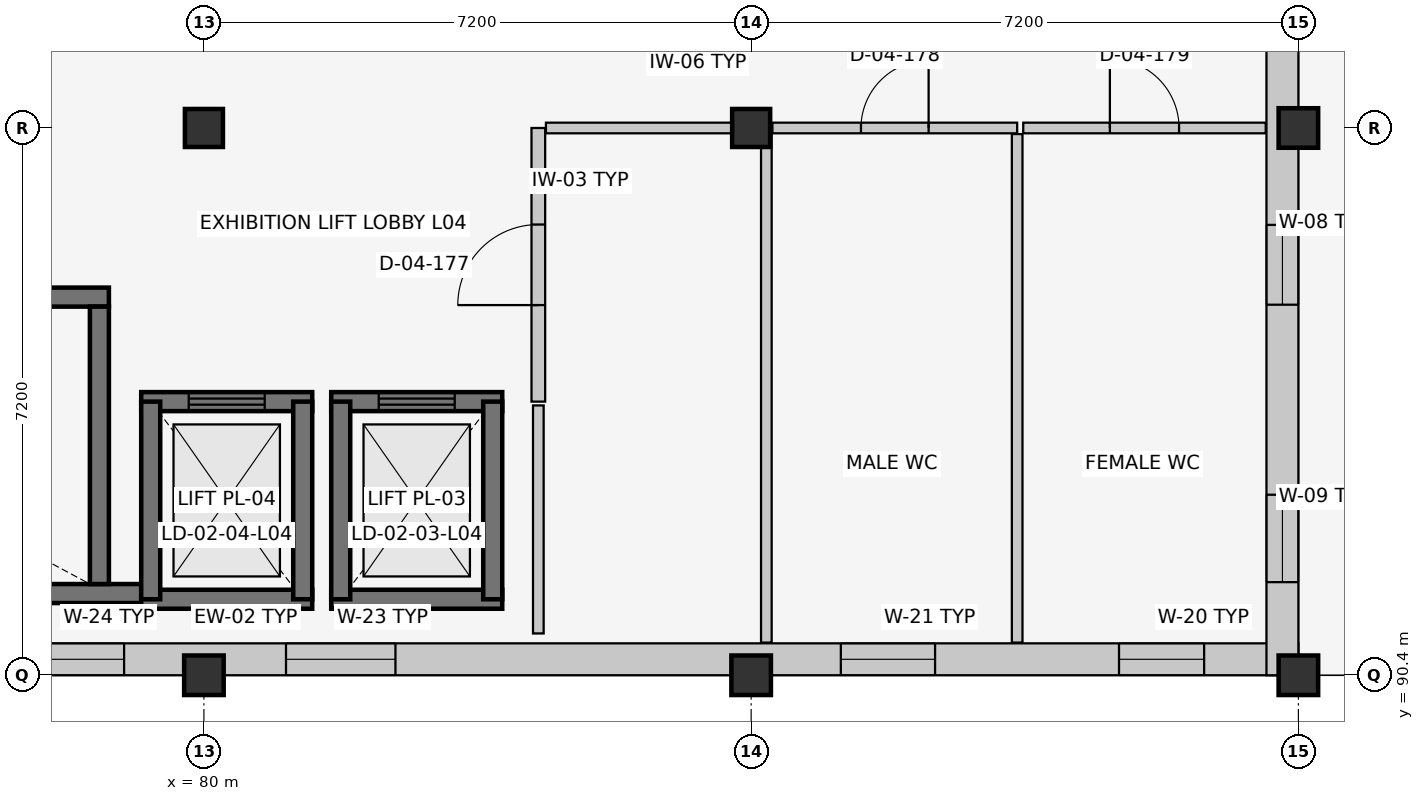
"""IFC4 building model, lengths in metres.
Left out: names, types, materials, properties, quantities, classifications, styles, units other than length and angle.
Written with IfcOpenShell. Run it as: python <this file> out.ifc"""

import sys

from ifc_helpers import new_model, si_unit, direction, frame, frame_2d, origin, origin_2d, place, context, subcontext, project, spatial, rectangle, extrude, element, fill, save


model = new_model("IFC4")
c1 = context("Model", 3, precision=1e-05, world=origin(), true_north=direction((0.0, 1.0)))
c2 = subcontext(c1, "Body", "Model", "MODEL_VIEW")
j1 = project(units=[si_unit("LENGTHUNIT", "METRE"), si_unit("PLANEANGLEUNIT", "RADIAN")], contexts=[c1])
p1 = place(None, origin())
s1 = spatial("IfcSite", under=j1, at=p1, CompositionType="ELEMENT")
p2 = place(p1, origin())
s2 = spatial("IfcBuilding", under=s1, at=p2, CompositionType="ELEMENT")
p3 = place(p2, frame((0.0, 0.0, 18.0)))
s3 = spatial("IfcBuildingStorey", under=s2, at=p3, CompositionType="ELEMENT", Elevation=18.0)
p4 = place(p3, frame((80.0, 90.4, 0.0), z_axis=(0.0, 0.0, 1.0), x_axis=(1.0, 0.0, 0.0)))
e1 = element("IfcColumn", 1, at=p4, inside=s3, PredefinedType="COLUMN", context=c2, shape_type="SweptSolid", body=[
    extrude(rectangle(XDim=0.52, YDim=0.52, at=origin_2d()), origin(), (0.0, 0.0, 1.0), 3.9),
])
p5 = place(p3, frame((80.0, 97.6, 0.0), z_axis=(0.0, 0.0, 1.0), x_axis=(1.0, 0.0, 0.0)))
e2 = element("IfcColumn", 2, at=p5, inside=s3, PredefinedType="COLUMN", context=c2, shape_type="SweptSolid", body=[
    extrude(rectangle(XDim=0.5, YDim=0.5, at=origin_2d()), origin(), (0.0, 0.0, 1.0), 3.9),
])
p6 = place(p3, frame((87.2, 90.4, 0.0), z_axis=(0.0, 0.0, 1.0), x_axis=(1.0, 0.0, 0.0)))
e3 = element("IfcColumn", 3, at=p6, inside=s3, PredefinedType="COLUMN", context=c2, shape_type="SweptSolid", body=[
    extrude(rectangle(XDim=0.52, YDim=0.52, at=origin_2d()), origin(), (0.0, 0.0, 1.0), 3.9),
])
p7 = place(p3, frame((87.2, 97.6, 0.0), z_axis=(0.0, 0.0, 1.0), x_axis=(1.0, 0.0, 0.0)))
e4 = element("IfcColumn", 4, at=p7, inside=s3, PredefinedType="COLUMN", context=c2, shape_type="SweptSolid", body=[
    extrude(rectangle(XDim=0.5, YDim=0.5, at=origin_2d()), origin(), (0.0, 0.0, 1.0), 3.9),
])
for number, where, z_axis, x_axis in (
    (5, (94.4, 90.4, 0.0), (0.0, 0.0, 1.0), (1.0, 0.0, 0.0)),
    (6, (94.4, 97.6, 0.0), (0.0, 0.0, 1.0), (1.0, 0.0, 0.0)),
):
    element("IfcColumn", number, at=place(p3, frame(where, z_axis=z_axis, x_axis=x_axis)), inside=s3, PredefinedType="COLUMN", context=c2, shape_type="SweptSolid", body=[
        extrude(rectangle(XDim=0.52, YDim=0.52, at=origin_2d()), origin(), (0.0, 0.0, 1.0), 3.9),
    ])
p8 = place(p3, frame((94.4, 90.61, 0.0), z_axis=(0.0, 0.0, 1.0), x_axis=(-1.0, 0.0, 0.0)))
e7 = element("IfcWall", 7, at=p8, inside=s3, PredefinedType="SOLIDWALL", context=c2, shape_type="SweptSolid", body=[
    extrude(rectangle(XDim=28.8, YDim=0.42, at=frame_2d((14.4, 0.0))), origin(), (0.0, 0.0, 1.0), 2.875),
])
p9 = place(p8, frame((1.24, 0.0, 0.9)))
e8 = element("IfcOpeningElement", 8, at=p9, cuts=e7, PredefinedType="OPENING", context=c2, shape_type="SweptSolid", body=[
    extrude(rectangle(XDim=1.12, YDim=1.75, at=frame_2d((0.56, 0.875))), frame((0.0, 0.222, 0.0), z_axis=(0.0, -1.0, 0.0), x_axis=(1.0, 0.0, 0.0)), (0.0, 0.0, 1.0), 0.444),
])
p10 = place(p8, frame((4.78, 0.0, 0.9)))
e9 = element("IfcOpeningElement", 9, at=p10, cuts=e7, PredefinedType="OPENING", context=c2, shape_type="SweptSolid", body=[
    extrude(rectangle(XDim=1.24, YDim=1.75, at=frame_2d((0.62, 0.875))), frame((0.0, 0.222, 0.0), z_axis=(0.0, -1.0, 0.0), x_axis=(1.0, 0.0, 0.0)), (0.0, 0.0, 1.0), 0.444),
])
p11 = place(p8, frame((11.88, 0.0, 0.9)))
e10 = element("IfcOpeningElement", 10, at=p11, cuts=e7, PredefinedType="OPENING", context=c2, shape_type="SweptSolid", body=[
    extrude(rectangle(XDim=1.44, YDim=1.75, at=frame_2d((0.72, 0.875))), frame((0.0, 0.222, 0.0), z_axis=(0.0, -1.0, 0.0), x_axis=(1.0, 0.0, 0.0)), (0.0, 0.0, 1.0), 0.444),
])
p12 = place(p8, frame((15.45, 0.0, 0.9)))
e11 = element("IfcOpeningElement", 11, at=p12, cuts=e7, PredefinedType="OPENING", context=c2, shape_type="SweptSolid", body=[
    extrude(rectangle(XDim=1.5, YDim=1.75, at=frame_2d((0.75, 0.875))), frame((0.0, 0.222, 0.0), z_axis=(0.0, -1.0, 0.0), x_axis=(1.0, 0.0, 0.0)), (0.0, 0.0, 1.0), 0.444),
])
p13 = place(p8, frame((19.35, 0.0, 0.9)))
e12 = element("IfcOpeningElement", 12, at=p13, cuts=e7, PredefinedType="OPENING", context=c2, shape_type="SweptSolid", body=[
    extrude(rectangle(XDim=0.9, YDim=1.35, at=frame_2d((0.45, 0.675))), frame((0.0, 0.222, 0.0), z_axis=(0.0, -1.0, 0.0), x_axis=(1.0, 0.0, 0.0)), (0.0, 0.0, 1.0), 0.444),
])
p14 = place(p8, frame((22.9, 0.0, 0.9)))
e13 = element("IfcOpeningElement", 13, at=p14, cuts=e7, PredefinedType="OPENING", context=c2, shape_type="SweptSolid", body=[
    extrude(rectangle(XDim=1.0, YDim=1.35, at=frame_2d((0.5, 0.675))), frame((0.0, 0.222, 0.0), z_axis=(0.0, -1.0, 0.0), x_axis=(1.0, 0.0, 0.0)), (0.0, 0.0, 1.0), 0.444),
])
p15 = place(p8, frame((26.45, 0.0, 0.9)))
e14 = element("IfcOpeningElement", 14, at=p15, cuts=e7, PredefinedType="OPENING", context=c2, shape_type="SweptSolid", body=[
    extrude(rectangle(XDim=1.1, YDim=1.35, at=frame_2d((0.55, 0.675))), frame((0.0, 0.222, 0.0), z_axis=(0.0, -1.0, 0.0), x_axis=(1.0, 0.0, 0.0)), (0.0, 0.0, 1.0), 0.444),
])
p16 = place(p3, frame((94.19, 112.0, 0.0), z_axis=(0.0, 0.0, 1.0), x_axis=(0.0, -1.0, 0.0)))
e15 = element("IfcWall", 15, at=p16, inside=s3, PredefinedType="SOLIDWALL", context=c2, shape_type="SweptSolid", body=[
    extrude(rectangle(XDim=21.6, YDim=0.42, at=frame_2d((10.8, 0.0))), origin(), (0.0, 0.0, 1.0), 2.975),
])
p17 = place(p16, frame((1.2, 0.0, 0.9)))
e16 = element("IfcOpeningElement", 16, at=p17, cuts=e15, PredefinedType="OPENING", context=c2, shape_type="SweptSolid", body=[
    extrude(rectangle(XDim=1.2, YDim=1.35, at=frame_2d((0.6, 0.675))), frame((0.0, 0.222, 0.0), z_axis=(0.0, -1.0, 0.0), x_axis=(1.0, 0.0, 0.0)), (0.0, 0.0, 1.0), 0.444),
])
p18 = place(p16, frame((4.75, 0.0, 0.9)))
e17 = element("IfcOpeningElement", 17, at=p18, cuts=e15, PredefinedType="OPENING", context=c2, shape_type="SweptSolid", body=[
    extrude(rectangle(XDim=1.3, YDim=1.35, at=frame_2d((0.65, 0.675))), frame((0.0, 0.222, 0.0), z_axis=(0.0, -1.0, 0.0), x_axis=(1.0, 0.0, 0.0)), (0.0, 0.0, 1.0), 0.444),
])
p19 = place(p16, frame((8.3, 0.0, 0.9)))
e18 = element("IfcOpeningElement", 18, at=p19, cuts=e15, PredefinedType="OPENING", context=c2, shape_type="SweptSolid", body=[
    extrude(rectangle(XDim=1.4, YDim=1.35, at=frame_2d((0.7, 0.675))), frame((0.0, 0.222, 0.0), z_axis=(0.0, -1.0, 0.0), x_axis=(1.0, 0.0, 0.0)), (0.0, 0.0, 1.0), 0.444),
])
p20 = place(p16, frame((12.125, 0.0, 0.9)))
e19 = element("IfcOpeningElement", 19, at=p20, cuts=e15, PredefinedType="OPENING", context=c2, shape_type="SweptSolid", body=[
    extrude(rectangle(XDim=0.95, YDim=1.45, at=frame_2d((0.475, 0.725))), frame((0.0, 0.222, 0.0), z_axis=(0.0, -1.0, 0.0), x_axis=(1.0, 0.0, 0.0)), (0.0, 0.0, 1.0), 0.444),
])
p21 = place(p16, frame((15.675, 0.0, 0.9)))
e20 = element("IfcOpeningElement", 20, at=p21, cuts=e15, PredefinedType="OPENING", context=c2, shape_type="SweptSolid", body=[
    extrude(rectangle(XDim=1.05, YDim=1.45, at=frame_2d((0.525, 0.725))), frame((0.0, 0.222, 0.0), z_axis=(0.0, -1.0, 0.0), x_axis=(1.0, 0.0, 0.0)), (0.0, 0.0, 1.0), 0.444),
])
p22 = place(p16, frame((19.225, 0.0, 0.9)))
e21 = element("IfcOpeningElement", 21, at=p22, cuts=e15, PredefinedType="OPENING", context=c2, shape_type="SweptSolid", body=[
    extrude(rectangle(XDim=1.15, YDim=1.45, at=frame_2d((0.575, 0.725))), frame((0.0, 0.222, 0.0), z_axis=(0.0, -1.0, 0.0), x_axis=(1.0, 0.0, 0.0)), (0.0, 0.0, 1.0), 0.444),
])
p23 = place(p3, frame((69.75, 91.475, 0.0), z_axis=(0.0, 0.0, 1.0), x_axis=(1.0, 0.0, 0.0)))
e22 = element("IfcWall", 22, at=p23, inside=s3, PredefinedType="SHEAR", context=c2, shape_type="SweptSolid", body=[
    extrude(rectangle(XDim=9.57, YDim=0.25, at=frame_2d((4.785, 0.0))), origin(), (0.0, 0.0, 1.0), 3.58),
])
p24 = place(p3, frame((78.75, 95.375, 0.0), z_axis=(0.0, 0.0, 1.0), x_axis=(-1.0, 0.0, 0.0)))
e23 = element("IfcWall", 23, at=p24, inside=s3, PredefinedType="SHEAR", context=c2, shape_type="SweptSolid", body=[
    extrude(rectangle(XDim=9.0, YDim=0.25, at=frame_2d((4.5, 0.0))), origin(), (0.0, 0.0, 1.0), 3.58),
])
p25 = place(p3, frame((78.625, 91.6, 0.0), z_axis=(0.0, 0.0, 1.0), x_axis=(0.0, 1.0, 0.0)))
e24 = element("IfcWall", 24, at=p25, inside=s3, PredefinedType="SHEAR", context=c2, shape_type="SweptSolid", body=[
    extrude(rectangle(XDim=3.65, YDim=0.25, at=frame_2d((1.825, 0.0))), origin(), (0.0, 0.0, 1.0), 3.58),
])
p26 = place(p3, frame((79.175, 91.4, 0.0), z_axis=(0.0, 0.0, 1.0), x_axis=(1.0, 0.0, 0.0)))
e25 = element("IfcWall", 25, at=p26, inside=s3, PredefinedType="SHEAR", context=c2, shape_type="SweptSolid", body=[
    extrude(rectangle(XDim=2.25, YDim=0.25, at=frame_2d((1.125, 0.0))), origin(), (0.0, 0.0, 1.0), 3.58),
])
p27 = place(p3, frame((81.425, 94.0, 0.0), z_axis=(0.0, 0.0, 1.0), x_axis=(-1.0, 0.0, 0.0)))
e26 = element("IfcWall", 26, at=p27, inside=s3, PredefinedType="SHEAR", context=c2, shape_type="SweptSolid", body=[
    extrude(rectangle(XDim=2.25, YDim=0.25, at=frame_2d((1.125, 0.0))), origin(), (0.0, 0.0, 1.0), 3.58),
])
p28 = place(p27, frame((0.625, 0.0, 0.0)))
e27 = element("IfcOpeningElement", 27, at=p28, cuts=e26, PredefinedType="OPENING", context=c2, shape_type="SweptSolid", body=[
    extrude(rectangle(XDim=1.0, YDim=2.15, at=frame_2d((0.5, 1.075))), frame((0.0, 0.137, 0.0), z_axis=(0.0, -1.0, 0.0), x_axis=(1.0, 0.0, 0.0)), (0.0, 0.0, 1.0), 0.274),
])
for number, where, z_axis, x_axis in (
    (28, (79.3, 94.0, 0.0), (0.0, 0.0, 1.0), (0.0, -1.0, 0.0)),
    (29, (81.3, 91.4, 0.0), (0.0, 0.0, 1.0), (0.0, 1.0, 0.0)),
):
    element("IfcWall", number, at=place(p3, frame(where, z_axis=z_axis, x_axis=x_axis)), inside=s3, PredefinedType="SHEAR", context=c2, shape_type="SweptSolid", body=[
        extrude(rectangle(XDim=2.6, YDim=0.25, at=frame_2d((1.3, 0.0))), origin(), (0.0, 0.0, 1.0), 3.58),
    ])
p29 = place(p3, frame((81.675, 91.4, 0.0), z_axis=(0.0, 0.0, 1.0), x_axis=(1.0, 0.0, 0.0)))
e30 = element("IfcWall", 30, at=p29, inside=s3, PredefinedType="SHEAR", context=c2, shape_type="SweptSolid", body=[
    extrude(rectangle(XDim=2.25, YDim=0.25, at=frame_2d((1.125, 0.0))), origin(), (0.0, 0.0, 1.0), 3.58),
])
p30 = place(p3, frame((83.925, 94.0, 0.0), z_axis=(0.0, 0.0, 1.0), x_axis=(-1.0, 0.0, 0.0)))
e31 = element("IfcWall", 31, at=p30, inside=s3, PredefinedType="SHEAR", context=c2, shape_type="SweptSolid", body=[
    extrude(rectangle(XDim=2.25, YDim=0.25, at=frame_2d((1.125, 0.0))), origin(), (0.0, 0.0, 1.0), 3.58),
])
p31 = place(p30, frame((0.625, 0.0, 0.0)))
e32 = element("IfcOpeningElement", 32, at=p31, cuts=e31, PredefinedType="OPENING", context=c2, shape_type="SweptSolid", body=[
    extrude(rectangle(XDim=1.0, YDim=2.15, at=frame_2d((0.5, 1.075))), frame((0.0, 0.137, 0.0), z_axis=(0.0, -1.0, 0.0), x_axis=(1.0, 0.0, 0.0)), (0.0, 0.0, 1.0), 0.274),
])
for number, where, z_axis, x_axis in (
    (33, (81.8, 94.0, 0.0), (0.0, 0.0, 1.0), (0.0, -1.0, 0.0)),
    (34, (83.8, 91.4, 0.0), (0.0, 0.0, 1.0), (0.0, 1.0, 0.0)),
):
    element("IfcWall", number, at=place(p3, frame(where, z_axis=z_axis, x_axis=x_axis)), inside=s3, PredefinedType="SHEAR", context=c2, shape_type="SweptSolid", body=[
        extrude(rectangle(XDim=2.6, YDim=0.25, at=frame_2d((1.3, 0.0))), origin(), (0.0, 0.0, 1.0), 3.58),
    ])
p32 = place(p3, frame((84.4, 94.0, 0.0), z_axis=(0.0, 0.0, 1.0), x_axis=(0.0, 1.0, 0.0)))
e35 = element("IfcWall", 35, at=p32, inside=s3, PredefinedType="PARTITIONING", context=c2, shape_type="SweptSolid", body=[
    extrude(rectangle(XDim=3.6, YDim=0.18, at=frame_2d((1.8, 0.0))), origin(), (0.0, 0.0, 1.0), 3.58),
])
p33 = place(p32, frame((1.27, 0.0, 0.0)))
e36 = element("IfcOpeningElement", 36, at=p33, cuts=e35, PredefinedType="OPENING", context=c2, shape_type="SweptSolid", body=[
    extrude(rectangle(XDim=1.06, YDim=2.1, at=frame_2d((0.53, 1.05))), frame((0.0, 0.102, 0.0), z_axis=(0.0, -1.0, 0.0), x_axis=(1.0, 0.0, 0.0)), (0.0, 0.0, 1.0), 0.204),
])
p34 = place(p3, frame((84.5, 97.6, 0.0), z_axis=(0.0, 0.0, 1.0), x_axis=(1.0, 0.0, 0.0)))
e37 = element("IfcWall", 37, at=p34, inside=s3, PredefinedType="PARTITIONING", context=c2, shape_type="SweptSolid", body=[
    extrude(rectangle(XDim=2.9, YDim=0.14, at=frame_2d((1.45, 0.0))), origin(), (0.0, 0.0, 1.0), 2.905),
])
p35 = place(p3, frame((87.4, 90.83, 0.0), z_axis=(0.0, 0.0, 1.0), x_axis=(0.0, 1.0, 0.0)))
e38 = element("IfcWall", 38, at=p35, inside=s3, PredefinedType="PARTITIONING", context=c2, shape_type="SweptSolid", body=[
    extrude(rectangle(XDim=6.69, YDim=0.14, at=frame_2d((3.345, 0.0))), origin(), (0.0, 0.0, 1.0), 2.955),
])
p36 = place(p3, frame((87.48, 97.6, 0.0), z_axis=(0.0, 0.0, 1.0), x_axis=(1.0, 0.0, 0.0)))
e39 = element("IfcWall", 39, at=p36, inside=s3, PredefinedType="PARTITIONING", context=c2, shape_type="SweptSolid", body=[
    extrude(rectangle(XDim=3.22, YDim=0.14, at=frame_2d((1.61, 0.0))), origin(), (0.0, 0.0, 1.0), 2.905),
])
p37 = place(p36, frame((1.165, 0.0, 0.0)))
e40 = element("IfcOpeningElement", 40, at=p37, cuts=e39, PredefinedType="OPENING", context=c2, shape_type="SweptSolid", body=[
    extrude(rectangle(XDim=0.89, YDim=2.05, at=frame_2d((0.445, 1.025))), frame((0.0, 0.082, 0.0), z_axis=(0.0, -1.0, 0.0), x_axis=(1.0, 0.0, 0.0)), (0.0, 0.0, 1.0), 0.164),
])
p38 = place(p3, frame((90.7, 90.83, 0.0), z_axis=(0.0, 0.0, 1.0), x_axis=(0.0, 1.0, 0.0)))
e41 = element("IfcWall", 41, at=p38, inside=s3, PredefinedType="PARTITIONING", context=c2, shape_type="SweptSolid", body=[
    extrude(rectangle(XDim=6.69, YDim=0.14, at=frame_2d((3.345, 0.0))), origin(), (0.0, 0.0, 1.0), 3.105),
])
p39 = place(p3, frame((90.78, 97.6, 0.0), z_axis=(0.0, 0.0, 1.0), x_axis=(1.0, 0.0, 0.0)))
e42 = element("IfcWall", 42, at=p39, inside=s3, PredefinedType="PARTITIONING", context=c2, shape_type="SweptSolid", body=[
    extrude(rectangle(XDim=3.19, YDim=0.14, at=frame_2d((1.595, 0.0))), origin(), (0.0, 0.0, 1.0), 2.905),
])
p40 = place(p39, frame((1.14, 0.0, 0.0)))
e43 = element("IfcOpeningElement", 43, at=p40, cuts=e42, PredefinedType="OPENING", context=c2, shape_type="SweptSolid", body=[
    extrude(rectangle(XDim=0.91, YDim=2.06, at=frame_2d((0.455, 1.03))), frame((0.0, 0.082, 0.0), z_axis=(0.0, -1.0, 0.0), x_axis=(1.0, 0.0, 0.0)), (0.0, 0.0, 1.0), 0.164),
])
p41 = place(p3, frame((84.4, 90.95, 0.0), z_axis=(0.0, 0.0, 1.0), x_axis=(0.0, 1.0, 0.0)))
e44 = element("IfcWall", 44, at=p41, inside=s3, PredefinedType="PARTITIONING", context=c2, shape_type="SweptSolid", body=[
    extrude(rectangle(XDim=3.0, YDim=0.14, at=frame_2d((1.5, 0.0))), origin(), (0.0, 0.0, 1.0), 3.58),
])
p42 = place(p9, origin())
e45 = element("IfcWindow", 45, at=p42, inside=s3, PartitioningType="SINGLE_PANEL", PredefinedType="WINDOW", context=c2, shape_type="SweptSolid", body=[
    extrude(rectangle(XDim=1.12, YDim=1.75, at=frame_2d((0.56, 0.875))), frame((0.0, 0.03, 0.0), z_axis=(0.0, -1.0, 0.0), x_axis=(1.0, 0.0, 0.0)), (0.0, 0.0, 1.0), 0.06),
])
fill(e8, e45)
p43 = place(p10, origin())
e46 = element("IfcWindow", 46, at=p43, inside=s3, PartitioningType="SINGLE_PANEL", PredefinedType="WINDOW", context=c2, shape_type="SweptSolid", body=[
    extrude(rectangle(XDim=1.24, YDim=1.75, at=frame_2d((0.62, 0.875))), frame((0.0, 0.03, 0.0), z_axis=(0.0, -1.0, 0.0), x_axis=(1.0, 0.0, 0.0)), (0.0, 0.0, 1.0), 0.06),
])
fill(e9, e46)
p44 = place(p11, origin())
e47 = element("IfcWindow", 47, at=p44, inside=s3, PartitioningType="SINGLE_PANEL", PredefinedType="WINDOW", context=c2, shape_type="SweptSolid", body=[
    extrude(rectangle(XDim=1.44, YDim=1.75, at=frame_2d((0.72, 0.875))), frame((0.0, 0.03, 0.0), z_axis=(0.0, -1.0, 0.0), x_axis=(1.0, 0.0, 0.0)), (0.0, 0.0, 1.0), 0.06),
])
fill(e10, e47)
p45 = place(p12, origin())
e48 = element("IfcWindow", 48, at=p45, inside=s3, PartitioningType="SINGLE_PANEL", PredefinedType="WINDOW", context=c2, shape_type="SweptSolid", body=[
    extrude(rectangle(XDim=1.5, YDim=1.75, at=frame_2d((0.75, 0.875))), frame((0.0, 0.03, 0.0), z_axis=(0.0, -1.0, 0.0), x_axis=(1.0, 0.0, 0.0)), (0.0, 0.0, 1.0), 0.06),
])
fill(e11, e48)
p46 = place(p21, origin())
e49 = element("IfcWindow", 49, at=p46, inside=s3, PartitioningType="SINGLE_PANEL", PredefinedType="WINDOW", context=c2, shape_type="SweptSolid", body=[
    extrude(rectangle(XDim=1.05, YDim=1.45, at=frame_2d((0.525, 0.725))), frame((0.0, 0.03, 0.0), z_axis=(0.0, -1.0, 0.0), x_axis=(1.0, 0.0, 0.0)), (0.0, 0.0, 1.0), 0.06),
])
fill(e20, e49)
p47 = place(p22, origin())
e50 = element("IfcWindow", 50, at=p47, inside=s3, PartitioningType="SINGLE_PANEL", PredefinedType="WINDOW", context=c2, shape_type="SweptSolid", body=[
    extrude(rectangle(XDim=1.15, YDim=1.45, at=frame_2d((0.575, 0.725))), frame((0.0, 0.03, 0.0), z_axis=(0.0, -1.0, 0.0), x_axis=(1.0, 0.0, 0.0)), (0.0, 0.0, 1.0), 0.06),
])
fill(e21, e50)
p48 = place(p28, origin())
e51 = element("IfcDoor", 51, at=p48, inside=s3, OperationType="SLIDING_TO_LEFT", PredefinedType="DOOR", context=c2, shape_type="SweptSolid", body=[
    extrude(rectangle(XDim=1.0, YDim=2.15, at=frame_2d((0.5, 1.075))), frame((0.0, 0.025, 0.0), z_axis=(0.0, -1.0, 0.0), x_axis=(1.0, 0.0, 0.0)), (0.0, 0.0, 1.0), 0.05),
])
fill(e27, e51)
p49 = place(p31, origin())
e52 = element("IfcDoor", 52, at=p49, inside=s3, OperationType="SLIDING_TO_LEFT", PredefinedType="DOOR", context=c2, shape_type="SweptSolid", body=[
    extrude(rectangle(XDim=1.0, YDim=2.15, at=frame_2d((0.5, 1.075))), frame((0.0, 0.025, 0.0), z_axis=(0.0, -1.0, 0.0), x_axis=(1.0, 0.0, 0.0)), (0.0, 0.0, 1.0), 0.05),
])
fill(e32, e52)
p50 = place(p33, origin())
e53 = element("IfcDoor", 53, at=p50, inside=s3, OperationType="SINGLE_SWING_LEFT", PredefinedType="DOOR", context=c2, shape_type="SweptSolid", body=[
    extrude(rectangle(XDim=1.06, YDim=2.1, at=frame_2d((0.53, 1.05))), frame((0.0, 0.025, 0.0), z_axis=(0.0, -1.0, 0.0), x_axis=(1.0, 0.0, 0.0)), (0.0, 0.0, 1.0), 0.05),
])
fill(e36, e53)
p51 = place(p37, origin())
e54 = element("IfcDoor", 54, at=p51, inside=s3, OperationType="SINGLE_SWING_RIGHT", PredefinedType="DOOR", context=c2, shape_type="SweptSolid", body=[
    extrude(rectangle(XDim=0.89, YDim=2.05, at=frame_2d((0.445, 1.025))), frame((0.0, 0.025, 0.0), z_axis=(0.0, -1.0, 0.0), x_axis=(1.0, 0.0, 0.0)), (0.0, 0.0, 1.0), 0.05),
])
fill(e40, e54)
p52 = place(p40, origin())
e55 = element("IfcDoor", 55, at=p52, inside=s3, OperationType="SINGLE_SWING_LEFT", PredefinedType="DOOR", context=c2, shape_type="SweptSolid", body=[
    extrude(rectangle(XDim=0.91, YDim=2.06, at=frame_2d((0.455, 1.03))), frame((0.0, 0.025, 0.0), z_axis=(0.0, -1.0, 0.0), x_axis=(1.0, 0.0, 0.0)), (0.0, 0.0, 1.0), 0.05),
])
fill(e43, e55)
save(model, sys.argv[1])
